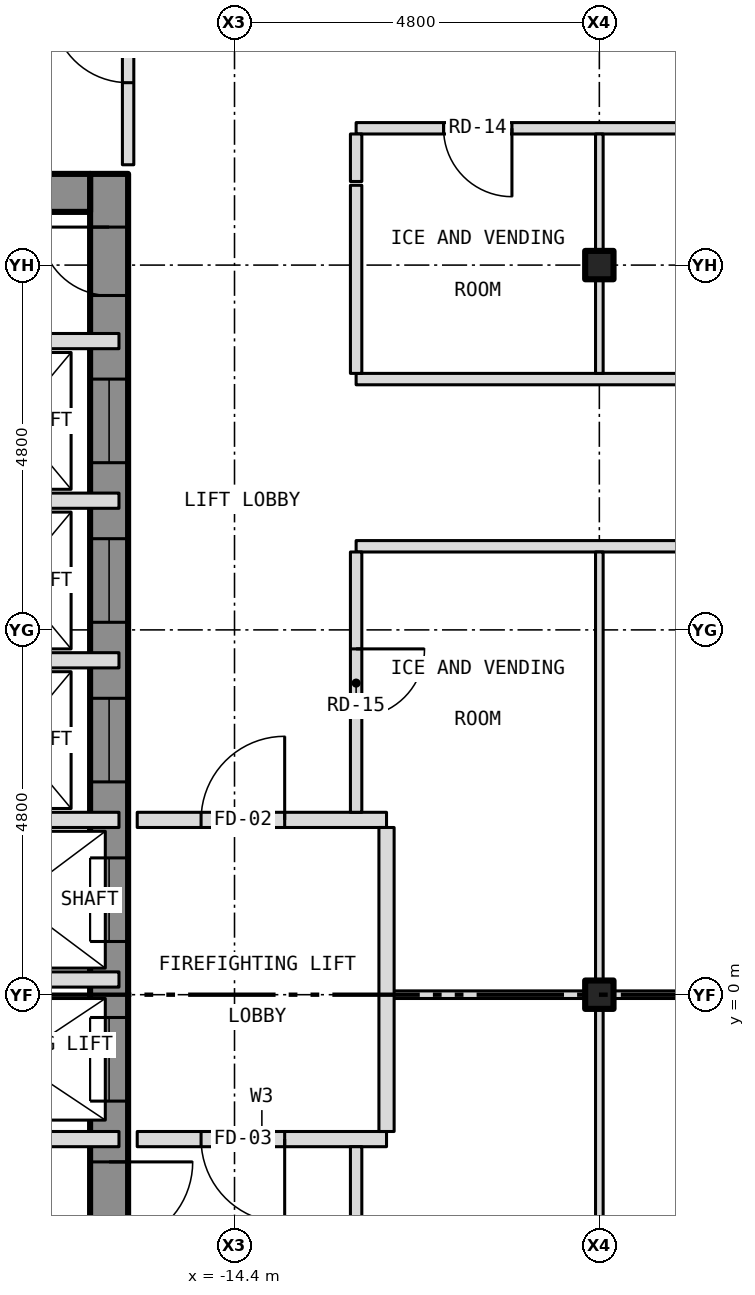
"""IFC4 building model, lengths in metres.
Left out: names, types, materials, properties, quantities, classifications, styles, units other than length and angle.
Written with IfcOpenShell. Run it as: python <this file> out.ifc"""

import sys

from ifc_helpers import new_model, si_unit, direction, frame, frame_2d, origin, origin_2d, place, context, subcontext, project, spatial, rectangle, i_section, extrude, element, fill, save


model = new_model("IFC4")
c1 = context("Model", 3, precision=1e-05, world=origin(), true_north=direction((0.0, 1.0)))
c2 = subcontext(c1, "Body", "Model", "MODEL_VIEW")
j1 = project(units=[si_unit("LENGTHUNIT", "METRE"), si_unit("PLANEANGLEUNIT", "RADIAN")], contexts=[c1])
p1 = place(None, origin())
s1 = spatial("IfcSite", under=j1, at=p1, CompositionType="ELEMENT")
p2 = place(p1, origin())
s2 = spatial("IfcBuilding", under=s1, at=p2, CompositionType="ELEMENT")
p3 = place(p2, frame((0.0, 0.0, 165.5)))
s3 = spatial("IfcBuildingStorey", under=s2, at=p3, CompositionType="ELEMENT", Elevation=165.5)
for number, where, z_axis, x_axis in (
    (1, (-9.6, 0.0, -0.15), (0.0, 0.0, 1.0), (1.0, 0.0, 0.0)),
    (2, (-9.6, 9.6, -0.15), (0.0, 0.0, 1.0), (1.0, 0.0, 0.0)),
):
    element("IfcColumn", number, at=place(p3, frame(where, z_axis=z_axis, x_axis=x_axis)), inside=s3, PredefinedType="COLUMN", context=c2, shape_type="SweptSolid", body=[
        extrude(i_section(OverallWidth=0.373, OverallDepth=0.373, WebThickness=0.016, FlangeThickness=0.026, at=origin_2d()), origin(), (0.0, 0.0, 1.0), 3.5),
    ])
p4 = place(p3, frame((-16.05, -10.8, 0.0), z_axis=(0.0, 0.0, 1.0), x_axis=(0.0, 1.0, 0.0)))
e3 = element("IfcWall", 3, at=p4, inside=s3, PredefinedType="SHEAR", context=c2, shape_type="SweptSolid", body=[
    extrude(rectangle(XDim=21.6, YDim=0.5, at=frame_2d((10.8, 0.0))), origin(), (0.0, 0.0, 1.0), 3.25),
])
p5 = place(p4, frame((9.4, 0.0, 0.0)))
e4 = element("IfcOpeningElement", 4, at=p5, cuts=e3, PredefinedType="OPENING", context=c2, shape_type="SweptSolid", body=[
    extrude(rectangle(XDim=1.1, YDim=2.1, at=frame_2d((0.55, 1.05))), frame((0.0, 0.262, 0.0), z_axis=(0.0, -1.0, 0.0), x_axis=(1.0, 0.0, 0.0)), (0.0, 0.0, 1.0), 0.524),
])
p6 = place(p4, frame((11.5, 0.0, 0.0)))
e5 = element("IfcOpeningElement", 5, at=p6, cuts=e3, PredefinedType="OPENING", context=c2, shape_type="SweptSolid", body=[
    extrude(rectangle(XDim=1.1, YDim=2.1, at=frame_2d((0.55, 1.05))), frame((0.0, 0.262, 0.0), z_axis=(0.0, -1.0, 0.0), x_axis=(1.0, 0.0, 0.0)), (0.0, 0.0, 1.0), 0.524),
])
p7 = place(p4, frame((13.6, 0.0, 0.0)))
e6 = element("IfcOpeningElement", 6, at=p7, cuts=e3, PredefinedType="OPENING", context=c2, shape_type="SweptSolid", body=[
    extrude(rectangle(XDim=1.1, YDim=2.1, at=frame_2d((0.55, 1.05))), frame((0.0, 0.262, 0.0), z_axis=(0.0, -1.0, 0.0), x_axis=(1.0, 0.0, 0.0)), (0.0, 0.0, 1.0), 0.524),
])
p8 = place(p4, frame((15.7, 0.0, 0.0)))
e7 = element("IfcOpeningElement", 7, at=p8, cuts=e3, PredefinedType="OPENING", context=c2, shape_type="SweptSolid", body=[
    extrude(rectangle(XDim=1.1, YDim=2.1, at=frame_2d((0.55, 1.05))), frame((0.0, 0.262, 0.0), z_axis=(0.0, -1.0, 0.0), x_axis=(1.0, 0.0, 0.0)), (0.0, 0.0, 1.0), 0.524),
])
p9 = place(p4, frame((17.8, 0.0, 0.0)))
e8 = element("IfcOpeningElement", 8, at=p9, cuts=e3, PredefinedType="OPENING", context=c2, shape_type="SweptSolid", body=[
    extrude(rectangle(XDim=1.1, YDim=2.1, at=frame_2d((0.55, 1.05))), frame((0.0, 0.262, 0.0), z_axis=(0.0, -1.0, 0.0), x_axis=(1.0, 0.0, 0.0)), (0.0, 0.0, 1.0), 0.524),
])
p10 = place(p4, frame((0.758, 0.0, 0.0)))
e9 = element("IfcOpeningElement", 9, at=p10, cuts=e3, PredefinedType="OPENING", context=c2, shape_type="SweptSolid", body=[
    extrude(rectangle(XDim=1.1, YDim=2.1, at=frame_2d((0.55, 1.05))), frame((0.0, 0.262, 0.0), z_axis=(0.0, -1.0, 0.0), x_axis=(1.0, 0.0, 0.0)), (0.0, 0.0, 1.0), 0.524),
])
p11 = place(p4, frame((7.5, 0.0, 0.0)))
e10 = element("IfcOpeningElement", 10, at=p11, cuts=e3, PredefinedType="OPENING", context=c2, shape_type="SweptSolid", body=[
    extrude(rectangle(XDim=1.1, YDim=2.1, at=frame_2d((0.55, 1.05))), frame((0.0, 0.262, 0.0), z_axis=(0.0, -1.0, 0.0), x_axis=(1.0, 0.0, 0.0)), (0.0, 0.0, 1.0), 0.524),
])
p12 = place(p4, frame((20.0, 0.0, 0.0)))
e11 = element("IfcOpeningElement", 11, at=p12, cuts=e3, PredefinedType="OPENING", context=c2, shape_type="SweptSolid", body=[
    extrude(rectangle(XDim=0.9, YDim=2.1, at=frame_2d((0.45, 1.05))), frame((0.0, 0.262, 0.0), z_axis=(0.0, -1.0, 0.0), x_axis=(1.0, 0.0, 0.0)), (0.0, 0.0, 1.0), 0.524),
])
p13 = place(p3, frame((-21.1, 10.55, 0.0), z_axis=(0.0, 0.0, 1.0), x_axis=(1.0, 0.0, 0.0)))
e12 = element("IfcWall", 12, at=p13, inside=s3, PredefinedType="SHEAR", context=c2, shape_type="SweptSolid", body=[
    extrude(rectangle(XDim=4.8, YDim=0.5, at=frame_2d((2.4, 0.0))), origin(), (0.0, 0.0, 1.0), 3.25),
])
p14 = place(p3, frame((-21.48, -1.9, 0.0), z_axis=(0.0, 0.0, 1.0), x_axis=(1.0, 0.0, 0.0)))
e13 = element("IfcWall", 13, at=p14, inside=s3, PredefinedType="PARTITIONING", context=c2, shape_type="SweptSolid", body=[
    extrude(rectangle(XDim=5.56, YDim=0.2, at=frame_2d((2.78, 0.0))), origin(), (0.0, 0.0, 1.0), 3.25),
])
p15 = place(p14, frame((0.83, 0.0, 0.0)))
e14 = element("IfcOpeningElement", 14, at=p15, cuts=e13, PredefinedType="OPENING", context=c2, shape_type="SweptSolid", body=[
    extrude(rectangle(XDim=0.9, YDim=2.1, at=frame_2d((0.45, 1.05))), frame((0.0, 0.112, 0.0), z_axis=(0.0, -1.0, 0.0), x_axis=(1.0, 0.0, 0.0)), (0.0, 0.0, 1.0), 0.224),
])
p16 = place(p3, frame((-15.68, -1.9, 0.0), z_axis=(0.0, 0.0, 1.0), x_axis=(1.0, 0.0, 0.0)))
e15 = element("IfcWall", 15, at=p16, inside=s3, PredefinedType="PARTITIONING", context=c2, shape_type="SweptSolid", body=[
    extrude(rectangle(XDim=3.28, YDim=0.2, at=frame_2d((1.64, 0.0))), origin(), (0.0, 0.0, 1.0), 3.35),
])
p17 = place(p16, frame((0.84, 0.0, 0.0)))
e16 = element("IfcOpeningElement", 16, at=p17, cuts=e15, PredefinedType="OPENING", context=c2, shape_type="SweptSolid", body=[
    extrude(rectangle(XDim=1.1, YDim=2.1, at=frame_2d((0.55, 1.05))), frame((0.0, 0.112, 0.0), z_axis=(0.0, -1.0, 0.0), x_axis=(1.0, 0.0, 0.0)), (0.0, 0.0, 1.0), 0.224),
])
p18 = place(p3, frame((-12.4, 0.0, 0.0), z_axis=(0.0, 0.0, 1.0), x_axis=(1.0, 0.0, 0.0)))
e17 = element("IfcWall", 17, at=p18, inside=s3, PredefinedType="PARTITIONING", context=c2, shape_type="SweptSolid", body=[
    extrude(rectangle(XDim=2.613, YDim=0.1, at=frame_2d((1.306, 0.0))), origin(), (0.0, 0.0, 1.0), 2.728),
])
p19 = place(p3, frame((-9.787, 0.0, 0.0), z_axis=(0.0, 0.0, 1.0), x_axis=(1.0, 0.0, 0.0)))
e18 = element("IfcWall", 18, at=p19, inside=s3, PredefinedType="PARTITIONING", context=c2, shape_type="SweptSolid", body=[
    extrude(rectangle(XDim=0.374, YDim=0.1, at=frame_2d((0.187, 0.0))), origin(), (0.0, 0.0, 1.0), 3.35),
])
p20 = place(p3, frame((-9.413, 0.0, 0.0), z_axis=(0.0, 0.0, 1.0), x_axis=(1.0, 0.0, 0.0)))
e19 = element("IfcWall", 19, at=p20, inside=s3, PredefinedType="PARTITIONING", context=c2, shape_type="SweptSolid", body=[
    extrude(rectangle(XDim=9.226, YDim=0.1, at=frame_2d((4.613, 0.0))), origin(), (0.0, 0.0, 1.0), 2.728),
])
for number, where, z_axis, x_axis in (
    (20, (-18.8, 0.2, 0.0), (0.0, 0.0, 1.0), (1.0, 0.0, 0.0)),
    (21, (-18.8, 2.3, 0.0), (0.0, 0.0, 1.0), (1.0, 0.0, 0.0)),
):
    element("IfcWall", number, at=place(p3, frame(where, z_axis=z_axis, x_axis=x_axis)), inside=s3, PredefinedType="PARTITIONING", context=c2, shape_type="SweptSolid", body=[
        extrude(rectangle(XDim=2.88, YDim=0.2, at=frame_2d((1.44, 0.0))), origin(), (0.0, 0.0, 1.0), 3.25),
    ])
p21 = place(p3, frame((-15.68, 2.3, 0.0), z_axis=(0.0, 0.0, 1.0), x_axis=(1.0, 0.0, 0.0)))
e22 = element("IfcWall", 22, at=p21, inside=s3, PredefinedType="PARTITIONING", context=c2, shape_type="SweptSolid", body=[
    extrude(rectangle(XDim=3.28, YDim=0.2, at=frame_2d((1.64, 0.0))), origin(), (0.0, 0.0, 1.0), 3.35),
])
p22 = place(p21, frame((0.84, 0.0, 0.0)))
e23 = element("IfcOpeningElement", 23, at=p22, cuts=e22, PredefinedType="OPENING", context=c2, shape_type="SweptSolid", body=[
    extrude(rectangle(XDim=1.1, YDim=2.1, at=frame_2d((0.55, 1.05))), frame((0.0, 0.112, 0.0), z_axis=(0.0, -1.0, 0.0), x_axis=(1.0, 0.0, 0.0)), (0.0, 0.0, 1.0), 0.224),
])
p23 = place(p3, frame((-21.48, 4.4, 0.0), z_axis=(0.0, 0.0, 1.0), x_axis=(1.0, 0.0, 0.0)))
e24 = element("IfcWall", 24, at=p23, inside=s3, PredefinedType="PARTITIONING", context=c2, shape_type="SweptSolid", body=[
    extrude(rectangle(XDim=5.56, YDim=0.2, at=frame_2d((2.78, 0.0))), origin(), (0.0, 0.0, 1.0), 3.25),
])
p24 = place(p23, frame((0.83, 0.0, 0.0)))
e25 = element("IfcOpeningElement", 25, at=p24, cuts=e24, PredefinedType="OPENING", context=c2, shape_type="SweptSolid", body=[
    extrude(rectangle(XDim=0.9, YDim=2.1, at=frame_2d((0.45, 1.05))), frame((0.0, 0.112, 0.0), z_axis=(0.0, -1.0, 0.0), x_axis=(1.0, 0.0, 0.0)), (0.0, 0.0, 1.0), 0.224),
])
p25 = place(p3, frame((-12.8, 5.9, 0.0), z_axis=(0.0, 0.0, 1.0), x_axis=(1.0, 0.0, 0.0)))
e26 = element("IfcWall", 26, at=p25, inside=s3, PredefinedType="PARTITIONING", context=c2, shape_type="SweptSolid", body=[
    extrude(rectangle(XDim=13.9, YDim=0.15, at=frame_2d((6.95, 0.0))), origin(), (0.0, 0.0, 1.0), 3.35),
])
p26 = place(p25, frame((8.1, 0.0, 0.0)))
e27 = element("IfcOpeningElement", 27, at=p26, cuts=e26, PredefinedType="OPENING", context=c2, shape_type="SweptSolid", body=[
    extrude(rectangle(XDim=0.9, YDim=2.1, at=frame_2d((0.45, 1.05))), frame((0.0, 0.087, 0.0), z_axis=(0.0, -1.0, 0.0), x_axis=(1.0, 0.0, 0.0)), (0.0, 0.0, 1.0), 0.174),
])
p27 = place(p3, frame((-18.8, 6.5, 0.0), z_axis=(0.0, 0.0, 1.0), x_axis=(1.0, 0.0, 0.0)))
e28 = element("IfcWall", 28, at=p27, inside=s3, PredefinedType="PARTITIONING", context=c2, shape_type="SweptSolid", body=[
    extrude(rectangle(XDim=2.88, YDim=0.2, at=frame_2d((1.44, 0.0))), origin(), (0.0, 0.0, 1.0), 3.25),
])
p28 = place(p3, frame((-12.8, 8.1, 0.0), z_axis=(0.0, 0.0, 1.0), x_axis=(1.0, 0.0, 0.0)))
e29 = element("IfcWall", 29, at=p28, inside=s3, PredefinedType="PARTITIONING", context=c2, shape_type="SweptSolid", body=[
    extrude(rectangle(XDim=13.9, YDim=0.15, at=frame_2d((6.95, 0.0))), origin(), (0.0, 0.0, 1.0), 3.35),
])
p29 = place(p28, frame((8.1, 0.0, 0.0)))
e30 = element("IfcOpeningElement", 30, at=p29, cuts=e29, PredefinedType="OPENING", context=c2, shape_type="SweptSolid", body=[
    extrude(rectangle(XDim=0.9, YDim=2.1, at=frame_2d((0.45, 1.05))), frame((0.0, 0.087, 0.0), z_axis=(0.0, -1.0, 0.0), x_axis=(1.0, 0.0, 0.0)), (0.0, 0.0, 1.0), 0.174),
])
p30 = place(p3, frame((-21.48, 8.6, 0.0), z_axis=(0.0, 0.0, 1.0), x_axis=(1.0, 0.0, 0.0)))
e31 = element("IfcWall", 31, at=p30, inside=s3, PredefinedType="PARTITIONING", context=c2, shape_type="SweptSolid", body=[
    extrude(rectangle(XDim=5.56, YDim=0.2, at=frame_2d((2.78, 0.0))), origin(), (0.0, 0.0, 1.0), 3.25),
])
p31 = place(p3, frame((-12.8, 11.4, 0.0), z_axis=(0.0, 0.0, 1.0), x_axis=(1.0, 0.0, 0.0)))
e32 = element("IfcWall", 32, at=p31, inside=s3, PredefinedType="PARTITIONING", context=c2, shape_type="SweptSolid", body=[
    extrude(rectangle(XDim=13.9, YDim=0.15, at=frame_2d((6.95, 0.0))), origin(), (0.0, 0.0, 1.0), 3.35),
])
p32 = place(p31, frame((1.15, 0.0, 0.0)))
e33 = element("IfcOpeningElement", 33, at=p32, cuts=e32, PredefinedType="OPENING", context=c2, shape_type="SweptSolid", body=[
    extrude(rectangle(XDim=0.9, YDim=2.1, at=frame_2d((0.45, 1.05))), frame((0.0, 0.087, 0.0), z_axis=(0.0, -1.0, 0.0), x_axis=(1.0, 0.0, 0.0)), (0.0, 0.0, 1.0), 0.174),
])
p33 = place(p3, frame((-15.8, 10.92, 0.0), z_axis=(0.0, 0.0, 1.0), x_axis=(0.0, 1.0, 0.0)))
e34 = element("IfcWall", 34, at=p33, inside=s3, PredefinedType="PARTITIONING", context=c2, shape_type="SweptSolid", body=[
    extrude(rectangle(XDim=2.605, YDim=0.15, at=frame_2d((1.302, 0.0))), origin(), (0.0, 0.0, 1.0), 3.35),
])
p34 = place(p33, frame((1.08, 0.0, 0.0)))
e35 = element("IfcOpeningElement", 35, at=p34, cuts=e34, PredefinedType="OPENING", context=c2, shape_type="SweptSolid", body=[
    extrude(rectangle(XDim=1.0, YDim=2.1, at=frame_2d((0.5, 1.05))), frame((0.0, 0.087, 0.0), z_axis=(0.0, -1.0, 0.0), x_axis=(1.0, 0.0, 0.0)), (0.0, 0.0, 1.0), 0.174),
])
p35 = place(p3, frame((-12.8, -11.325, 0.0), z_axis=(0.0, 0.0, 1.0), x_axis=(0.0, 1.0, 0.0)))
e36 = element("IfcWall", 36, at=p35, inside=s3, PredefinedType="PARTITIONING", context=c2, shape_type="SweptSolid", body=[
    extrude(rectangle(XDim=9.325, YDim=0.15, at=frame_2d((4.663, 0.0))), origin(), (0.0, 0.0, 1.0), 3.35),
])
p36 = place(p35, frame((4.525, 0.0, 0.0)))
e37 = element("IfcOpeningElement", 37, at=p36, cuts=e36, PredefinedType="OPENING", context=c2, shape_type="SweptSolid", body=[
    extrude(rectangle(XDim=0.9, YDim=2.1, at=frame_2d((0.45, 1.05))), frame((0.0, 0.087, 0.0), z_axis=(0.0, -1.0, 0.0), x_axis=(1.0, 0.0, 0.0)), (0.0, 0.0, 1.0), 0.174),
])
p37 = place(p3, frame((-12.8, 2.4, 0.0), z_axis=(0.0, 0.0, 1.0), x_axis=(0.0, 1.0, 0.0)))
e38 = element("IfcWall", 38, at=p37, inside=s3, PredefinedType="PARTITIONING", context=c2, shape_type="SweptSolid", body=[
    extrude(rectangle(XDim=3.425, YDim=0.15, at=frame_2d((1.712, 0.0))), origin(), (0.0, 0.0, 1.0), 3.35),
])
p38 = place(p37, frame((1.25, 0.0, 0.0)))
e39 = element("IfcOpeningElement", 39, at=p38, cuts=e38, PredefinedType="OPENING", context=c2, shape_type="SweptSolid", body=[
    extrude(rectangle(XDim=0.9, YDim=2.1, at=frame_2d((0.45, 1.05))), frame((0.0, 0.087, 0.0), z_axis=(0.0, -1.0, 0.0), x_axis=(1.0, 0.0, 0.0)), (0.0, 0.0, 1.0), 0.174),
])
p39 = place(p3, frame((-12.8, 8.175, 0.0), z_axis=(0.0, 0.0, 1.0), x_axis=(0.0, 1.0, 0.0)))
e40 = element("IfcWall", 40, at=p39, inside=s3, PredefinedType="PARTITIONING", context=c2, shape_type="SweptSolid", body=[
    extrude(rectangle(XDim=2.475, YDim=0.15, at=frame_2d((1.237, 0.0))), origin(), (0.0, 0.0, 1.0), 3.35),
])
p40 = place(p3, frame((-12.8, 10.7, 0.0), z_axis=(0.0, 0.0, 1.0), x_axis=(0.0, 1.0, 0.0)))
e41 = element("IfcWall", 41, at=p40, inside=s3, PredefinedType="PARTITIONING", context=c2, shape_type="SweptSolid", body=[
    extrude(rectangle(XDim=0.625, YDim=0.15, at=frame_2d((0.312, 0.0))), origin(), (0.0, 0.0, 1.0), 3.35),
])
p41 = place(p3, frame((-12.4, -1.8, 0.0), z_axis=(0.0, 0.0, 1.0), x_axis=(0.0, 1.0, 0.0)))
e42 = element("IfcWall", 42, at=p41, inside=s3, PredefinedType="PARTITIONING", context=c2, shape_type="SweptSolid", body=[
    extrude(rectangle(XDim=4.0, YDim=0.2, at=frame_2d((2.0, 0.0))), origin(), (0.0, 0.0, 1.0), 3.35),
])
p42 = place(p3, frame((-9.6, -9.413, 0.0), z_axis=(0.0, 0.0, 1.0), x_axis=(0.0, 1.0, 0.0)))
e43 = element("IfcWall", 43, at=p42, inside=s3, PredefinedType="PARTITIONING", context=c2, shape_type="SweptSolid", body=[
    extrude(rectangle(XDim=9.363, YDim=0.1, at=frame_2d((4.682, 0.0))), origin(), (0.0, 0.0, 1.0), 2.728),
])
p43 = place(p3, frame((-9.6, 0.05, 0.0), z_axis=(0.0, 0.0, 1.0), x_axis=(0.0, 1.0, 0.0)))
e44 = element("IfcWall", 44, at=p43, inside=s3, PredefinedType="PARTITIONING", context=c2, shape_type="SweptSolid", body=[
    extrude(rectangle(XDim=5.775, YDim=0.1, at=frame_2d((2.887, 0.0))), origin(), (0.0, 0.0, 1.0), 2.728),
])
p44 = place(p3, frame((-9.6, 8.175, 0.0), z_axis=(0.0, 0.0, 1.0), x_axis=(0.0, 1.0, 0.0)))
e45 = element("IfcWall", 45, at=p44, inside=s3, PredefinedType="PARTITIONING", context=c2, shape_type="SweptSolid", body=[
    extrude(rectangle(XDim=1.238, YDim=0.1, at=frame_2d((0.619, 0.0))), origin(), (0.0, 0.0, 1.0), 2.728),
])
p45 = place(p3, frame((-9.6, 9.413, 0.0), z_axis=(0.0, 0.0, 1.0), x_axis=(0.0, 1.0, 0.0)))
e46 = element("IfcWall", 46, at=p45, inside=s3, PredefinedType="PARTITIONING", context=c2, shape_type="SweptSolid", body=[
    extrude(rectangle(XDim=0.374, YDim=0.1, at=frame_2d((0.187, 0.0))), origin(), (0.0, 0.0, 1.0), 3.35),
])
p46 = place(p3, frame((-9.6, 9.787, 0.0), z_axis=(0.0, 0.0, 1.0), x_axis=(0.0, 1.0, 0.0)))
e47 = element("IfcWall", 47, at=p46, inside=s3, PredefinedType="PARTITIONING", context=c2, shape_type="SweptSolid", body=[
    extrude(rectangle(XDim=1.538, YDim=0.1, at=frame_2d((0.769, 0.0))), origin(), (0.0, 0.0, 1.0), 2.728),
])
p47 = place(p5, origin())
e48 = element("IfcDoor", 48, at=p47, inside=s3, OperationType="SLIDING_TO_LEFT", PredefinedType="DOOR", context=c2, shape_type="SweptSolid", body=[
    extrude(rectangle(XDim=1.1, YDim=2.1, at=frame_2d((0.55, 1.05))), frame((0.0, 0.025, 0.0), z_axis=(0.0, -1.0, 0.0), x_axis=(1.0, 0.0, 0.0)), (0.0, 0.0, 1.0), 0.05),
])
fill(e4, e48)
p48 = place(p6, origin())
e49 = element("IfcDoor", 49, at=p48, inside=s3, OperationType="SLIDING_TO_LEFT", PredefinedType="DOOR", context=c2, shape_type="SweptSolid", body=[
    extrude(rectangle(XDim=1.1, YDim=2.1, at=frame_2d((0.55, 1.05))), frame((0.0, 0.025, 0.0), z_axis=(0.0, -1.0, 0.0), x_axis=(1.0, 0.0, 0.0)), (0.0, 0.0, 1.0), 0.05),
])
fill(e5, e49)
p49 = place(p7, origin())
e50 = element("IfcDoor", 50, at=p49, inside=s3, OperationType="SLIDING_TO_LEFT", PredefinedType="DOOR", context=c2, shape_type="SweptSolid", body=[
    extrude(rectangle(XDim=1.1, YDim=2.1, at=frame_2d((0.55, 1.05))), frame((0.0, 0.025, 0.0), z_axis=(0.0, -1.0, 0.0), x_axis=(1.0, 0.0, 0.0)), (0.0, 0.0, 1.0), 0.05),
])
fill(e6, e50)
p50 = place(p8, origin())
e51 = element("IfcDoor", 51, at=p50, inside=s3, OperationType="SLIDING_TO_LEFT", PredefinedType="DOOR", context=c2, shape_type="SweptSolid", body=[
    extrude(rectangle(XDim=1.1, YDim=2.1, at=frame_2d((0.55, 1.05))), frame((0.0, 0.025, 0.0), z_axis=(0.0, -1.0, 0.0), x_axis=(1.0, 0.0, 0.0)), (0.0, 0.0, 1.0), 0.05),
])
fill(e7, e51)
p51 = place(p9, origin())
e52 = element("IfcDoor", 52, at=p51, inside=s3, OperationType="SLIDING_TO_LEFT", PredefinedType="DOOR", context=c2, shape_type="SweptSolid", body=[
    extrude(rectangle(XDim=1.1, YDim=2.1, at=frame_2d((0.55, 1.05))), frame((0.0, 0.025, 0.0), z_axis=(0.0, -1.0, 0.0), x_axis=(1.0, 0.0, 0.0)), (0.0, 0.0, 1.0), 0.05),
])
fill(e8, e52)
p52 = place(p11, origin())
e53 = element("IfcDoor", 53, at=p52, inside=s3, OperationType="SINGLE_SWING_RIGHT", PredefinedType="DOOR", context=c2, shape_type="SweptSolid", body=[
    extrude(rectangle(XDim=1.1, YDim=2.1, at=frame_2d((0.55, 1.05))), frame((0.0, 0.025, 0.0), z_axis=(0.0, -1.0, 0.0), x_axis=(1.0, 0.0, 0.0)), (0.0, 0.0, 1.0), 0.05),
])
fill(e10, e53)
p53 = place(p12, origin())
e54 = element("IfcDoor", 54, at=p53, inside=s3, OperationType="SINGLE_SWING_RIGHT", PredefinedType="DOOR", context=c2, shape_type="SweptSolid", body=[
    extrude(rectangle(XDim=0.9, YDim=2.1, at=frame_2d((0.45, 1.05))), frame((0.0, 0.025, 0.0), z_axis=(0.0, -1.0, 0.0), x_axis=(1.0, 0.0, 0.0)), (0.0, 0.0, 1.0), 0.05),
])
fill(e11, e54)
p54 = place(p22, origin())
e55 = element("IfcDoor", 55, at=p54, inside=s3, OperationType="SINGLE_SWING_RIGHT", PredefinedType="DOOR", context=c2, shape_type="SweptSolid", body=[
    extrude(rectangle(XDim=1.1, YDim=2.1, at=frame_2d((0.55, 1.05))), frame((0.0, 0.025, 0.0), z_axis=(0.0, -1.0, 0.0), x_axis=(1.0, 0.0, 0.0)), (0.0, 0.0, 1.0), 0.05),
])
fill(e23, e55)
p55 = place(p17, origin())
e56 = element("IfcDoor", 56, at=p55, inside=s3, OperationType="SINGLE_SWING_RIGHT", PredefinedType="DOOR", context=c2, shape_type="SweptSolid", body=[
    extrude(rectangle(XDim=1.1, YDim=2.1, at=frame_2d((0.55, 1.05))), frame((0.0, 0.025, 0.0), z_axis=(0.0, -1.0, 0.0), x_axis=(1.0, 0.0, 0.0)), (0.0, 0.0, 1.0), 0.05),
])
fill(e16, e56)
p56 = place(p34, origin())
e57 = element("IfcDoor", 57, at=p56, inside=s3, OperationType="SINGLE_SWING_RIGHT", PredefinedType="DOOR", context=c2, shape_type="SweptSolid", body=[
    extrude(rectangle(XDim=1.0, YDim=2.1, at=frame_2d((0.5, 1.05))), frame((0.0, 0.025, 0.0), z_axis=(0.0, -1.0, 0.0), x_axis=(1.0, 0.0, 0.0)), (0.0, 0.0, 1.0), 0.05),
])
fill(e35, e57)
p57 = place(p32, origin())
e58 = element("IfcDoor", 58, at=p57, inside=s3, OperationType="SINGLE_SWING_RIGHT", PredefinedType="DOOR", context=c2, shape_type="SweptSolid", body=[
    extrude(rectangle(XDim=0.9, YDim=2.1, at=frame_2d((0.45, 1.05))), frame((0.0, 0.025, 0.0), z_axis=(0.0, -1.0, 0.0), x_axis=(1.0, 0.0, 0.0)), (0.0, 0.0, 1.0), 0.05),
])
fill(e33, e58)
p58 = place(p38, origin())
e59 = element("IfcDoor", 59, at=p58, inside=s3, OperationType="SINGLE_SWING_RIGHT", PredefinedType="DOOR", context=c2, shape_type="SweptSolid", body=[
    extrude(rectangle(XDim=0.9, YDim=2.1, at=frame_2d((0.45, 1.05))), frame((0.0, 0.025, 0.0), z_axis=(0.0, -1.0, 0.0), x_axis=(1.0, 0.0, 0.0)), (0.0, 0.0, 1.0), 0.05),
])
fill(e39, e59)
save(model, sys.argv[1])
